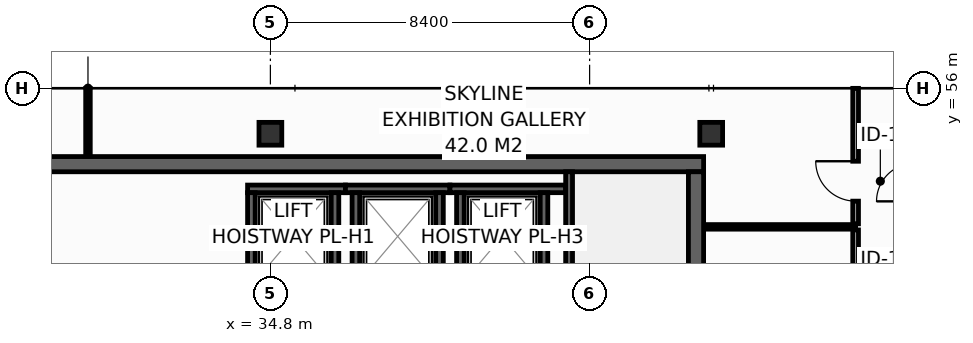
"""IFC4 building model, lengths in metres.
Left out: names, types, materials, properties, quantities, classifications, styles, units other than length and angle.
Written with IfcOpenShell. Run it as: python <this file> out.ifc"""

import sys

from ifc_helpers import new_model, si_unit, direction, frame, frame_2d, origin, origin_2d, place, context, subcontext, project, spatial, rectangle, hollow_rectangle, extrude, element, fill, save


model = new_model("IFC4")
c1 = context("Model", 3, precision=1e-05, world=origin(), true_north=direction((0.0, 1.0)))
c2 = subcontext(c1, "Body", "Model", "MODEL_VIEW")
j1 = project(units=[si_unit("LENGTHUNIT", "METRE"), si_unit("PLANEANGLEUNIT", "RADIAN")], contexts=[c1])
p1 = place(None, origin())
s1 = spatial("IfcSite", under=j1, at=p1, CompositionType="ELEMENT")
p2 = place(p1, origin())
s2 = spatial("IfcBuilding", under=s1, at=p2, CompositionType="ELEMENT")
p3 = place(p2, frame((0.0, 0.0, 295.2)))
s3 = spatial("IfcBuildingStorey", under=s2, at=p3, CompositionType="ELEMENT", Elevation=295.2)
p4 = place(p3, frame((13.7, 54.0, 0.0), z_axis=(0.0, 0.0, 1.0), x_axis=(1.0, 0.0, 0.0)))
e1 = element("IfcWall", 1, at=p4, inside=s3, PredefinedType="SHEAR", context=c2, shape_type="SweptSolid", body=[
    extrude(rectangle(XDim=32.5, YDim=0.4, at=frame_2d((16.25, 0.0))), origin(), (0.0, 0.0, 1.0), 3.55),
])
p5 = place(p3, frame((46.0, 43.4, 0.0), z_axis=(0.0, 0.0, 1.0), x_axis=(0.0, 1.0, 0.0)))
e2 = element("IfcWall", 2, at=p5, inside=s3, PredefinedType="SHEAR", context=c2, shape_type="SweptSolid", body=[
    extrude(rectangle(XDim=10.4, YDim=0.4, at=frame_2d((5.2, 0.0))), origin(), (0.0, 0.0, 1.0), 3.55),
])
for number, where, z_axis, x_axis in (
    (3, (34.8, 54.8, 0.0), (0.0, 0.0, 1.0), (1.0, 0.0, 0.0)),
    (4, (46.4, 54.8, 0.0), (0.0, 0.0, 1.0), (1.0, 0.0, 0.0)),
):
    element("IfcColumn", number, at=place(p3, frame(where, z_axis=z_axis, x_axis=x_axis)), inside=s3, PredefinedType="COLUMN", context=c2, shape_type="SweptSolid", body=[
        extrude(hollow_rectangle(XDim=0.6, YDim=0.6, WallThickness=0.028, at=origin_2d()), origin(), (0.0, 0.0, 1.0), 3.8),
    ])
p6 = place(p3, frame((34.2, 53.35, 0.0), z_axis=(0.0, 0.0, 1.0), x_axis=(1.0, 0.0, 0.0)))
e5 = element("IfcWall", 5, at=p6, inside=s3, PredefinedType="SHEAR", context=c2, shape_type="SweptSolid", body=[
    extrude(rectangle(XDim=2.575, YDim=0.2, at=frame_2d((1.288, 0.0))), origin(), (0.0, 0.0, 1.0), 3.55),
])
for number, where, z_axis, x_axis in (
    (6, (34.3, 50.95, 0.0), (0.0, 0.0, 1.0), (0.0, 1.0, 0.0)),
    (7, (36.5, 50.95, 0.0), (0.0, 0.0, 1.0), (0.0, 1.0, 0.0)),
):
    element("IfcWall", number, at=place(p3, frame(where, z_axis=z_axis, x_axis=x_axis)), inside=s3, PredefinedType="SHEAR", context=c2, shape_type="SweptSolid", body=[
        extrude(rectangle(XDim=2.3, YDim=0.2, at=frame_2d((1.15, 0.0))), origin(), (0.0, 0.0, 1.0), 3.55),
    ])
p7 = place(p3, frame((36.775, 53.35, 0.0), z_axis=(0.0, 0.0, 1.0), x_axis=(1.0, 0.0, 0.0)))
e8 = element("IfcWall", 8, at=p7, inside=s3, PredefinedType="SHEAR", context=c2, shape_type="SweptSolid", body=[
    extrude(rectangle(XDim=2.75, YDim=0.2, at=frame_2d((1.375, 0.0))), origin(), (0.0, 0.0, 1.0), 3.55),
])
for number, where, z_axis, x_axis in (
    (9, (37.05, 50.95, 0.0), (0.0, 0.0, 1.0), (0.0, 1.0, 0.0)),
    (10, (39.25, 50.95, 0.0), (0.0, 0.0, 1.0), (0.0, 1.0, 0.0)),
):
    element("IfcWall", number, at=place(p3, frame(where, z_axis=z_axis, x_axis=x_axis)), inside=s3, PredefinedType="SHEAR", context=c2, shape_type="SweptSolid", body=[
        extrude(rectangle(XDim=2.3, YDim=0.2, at=frame_2d((1.15, 0.0))), origin(), (0.0, 0.0, 1.0), 3.55),
    ])
p8 = place(p3, frame((39.525, 53.35, 0.0), z_axis=(0.0, 0.0, 1.0), x_axis=(1.0, 0.0, 0.0)))
e11 = element("IfcWall", 11, at=p8, inside=s3, PredefinedType="SHEAR", context=c2, shape_type="SweptSolid", body=[
    extrude(rectangle(XDim=3.045, YDim=0.2, at=frame_2d((1.522, 0.0))), origin(), (0.0, 0.0, 1.0), 3.55),
])
for number, where, z_axis, x_axis in (
    (12, (39.8, 50.95, 0.0), (0.0, 0.0, 1.0), (0.0, 1.0, 0.0)),
    (13, (42.0, 50.95, 0.0), (0.0, 0.0, 1.0), (0.0, 1.0, 0.0)),
):
    element("IfcWall", number, at=place(p3, frame(where, z_axis=z_axis, x_axis=x_axis)), inside=s3, PredefinedType="SHEAR", context=c2, shape_type="SweptSolid", body=[
        extrude(rectangle(XDim=2.3, YDim=0.2, at=frame_2d((1.15, 0.0))), origin(), (0.0, 0.0, 1.0), 3.55),
    ])
p9 = place(p3, frame((42.66, 53.8, 0.0), z_axis=(0.0, 0.0, 1.0), x_axis=(0.0, -1.0, 0.0)))
e14 = element("IfcWall", 14, at=p9, inside=s3, PredefinedType="SHEAR", context=c2, shape_type="SweptSolid", body=[
    extrude(rectangle(XDim=10.4, YDim=0.18, at=frame_2d((5.2, 0.0))), origin(), (0.0, 0.0, 1.0), 3.55),
])
p10 = place(p9, frame((8.99, 0.0, 0.0)))
e15 = element("IfcOpeningElement", 15, at=p10, cuts=e14, PredefinedType="OPENING", context=c2, shape_type="SweptSolid", body=[
    extrude(rectangle(XDim=1.1, YDim=2.15, at=frame_2d((0.55, 1.075))), frame((0.0, 0.1, 0.0), z_axis=(0.0, -1.0, 0.0), x_axis=(1.0, 0.0, 0.0)), (0.0, 0.0, 1.0), 0.2),
])
p11 = place(p3, frame((46.22, 52.35, 0.0), z_axis=(0.0, 0.0, 1.0), x_axis=(1.0, 0.0, 0.0)))
e16 = element("IfcWall", 16, at=p11, inside=s3, PredefinedType="PARTITIONING", context=c2, shape_type="SweptSolid", body=[
    extrude(rectangle(XDim=3.98, YDim=0.12, at=frame_2d((1.99, 0.0))), origin(), (0.0, 0.0, 1.0), 3.55),
])
p12 = place(p3, frame((30.0, 54.22, 0.0), z_axis=(0.0, 0.0, 1.0), x_axis=(0.0, 1.0, 0.0)))
e17 = element("IfcWall", 17, at=p12, inside=s3, PredefinedType="PARTITIONING", context=c2, shape_type="SweptSolid", body=[
    extrude(rectangle(XDim=1.775, YDim=0.12, at=frame_2d((0.888, 0.0))), origin(), (0.0, 0.0, 1.0), 2.935),
])
p13 = place(p3, frame((50.2, 48.29, 0.0), z_axis=(0.0, 0.0, 1.0), x_axis=(0.0, 1.0, 0.0)))
e18 = element("IfcWall", 18, at=p13, inside=s3, PredefinedType="PARTITIONING", context=c2, shape_type="SweptSolid", body=[
    extrude(rectangle(XDim=3.98, YDim=0.15, at=frame_2d((1.99, 0.0))), origin(), (0.0, 0.0, 1.0), 3.55),
])
p14 = place(p13, frame((1.465, 0.0, 0.0)))
e19 = element("IfcOpeningElement", 19, at=p14, cuts=e18, PredefinedType="OPENING", context=c2, shape_type="SweptSolid", body=[
    extrude(rectangle(XDim=1.05, YDim=2.15, at=frame_2d((0.525, 1.075))), frame((0.0, 0.085, 0.0), z_axis=(0.0, -1.0, 0.0), x_axis=(1.0, 0.0, 0.0)), (0.0, 0.0, 1.0), 0.17),
])
p15 = place(p3, frame((50.2, 52.43, 0.0), z_axis=(0.0, 0.0, 1.0), x_axis=(0.0, 1.0, 0.0)))
e20 = element("IfcWall", 20, at=p15, inside=s3, PredefinedType="PARTITIONING", context=c2, shape_type="SweptSolid", body=[
    extrude(rectangle(XDim=3.565, YDim=0.15, at=frame_2d((1.783, 0.0))), origin(), (0.0, 0.0, 1.0), 2.935),
])
p16 = place(p15, frame((0.597, 0.0, 0.0)))
e21 = element("IfcOpeningElement", 21, at=p16, cuts=e20, PredefinedType="OPENING", context=c2, shape_type="SweptSolid", body=[
    extrude(rectangle(XDim=1.05, YDim=2.15, at=frame_2d((0.525, 1.075))), frame((0.0, 0.085, 0.0), z_axis=(0.0, -1.0, 0.0), x_axis=(1.0, 0.0, 0.0)), (0.0, 0.0, 1.0), 0.17),
])
p17 = place(p16, origin())
e22 = element("IfcDoor", 22, at=p17, inside=s3, OperationType="SINGLE_SWING_RIGHT", PredefinedType="DOOR", context=c2, shape_type="SweptSolid", body=[
    extrude(rectangle(XDim=1.05, YDim=2.15, at=frame_2d((0.525, 1.075))), frame((0.0, 0.025, 0.0), z_axis=(0.0, -1.0, 0.0), x_axis=(1.0, 0.0, 0.0)), (0.0, 0.0, 1.0), 0.05),
])
fill(e21, e22)
save(model, sys.argv[1])
